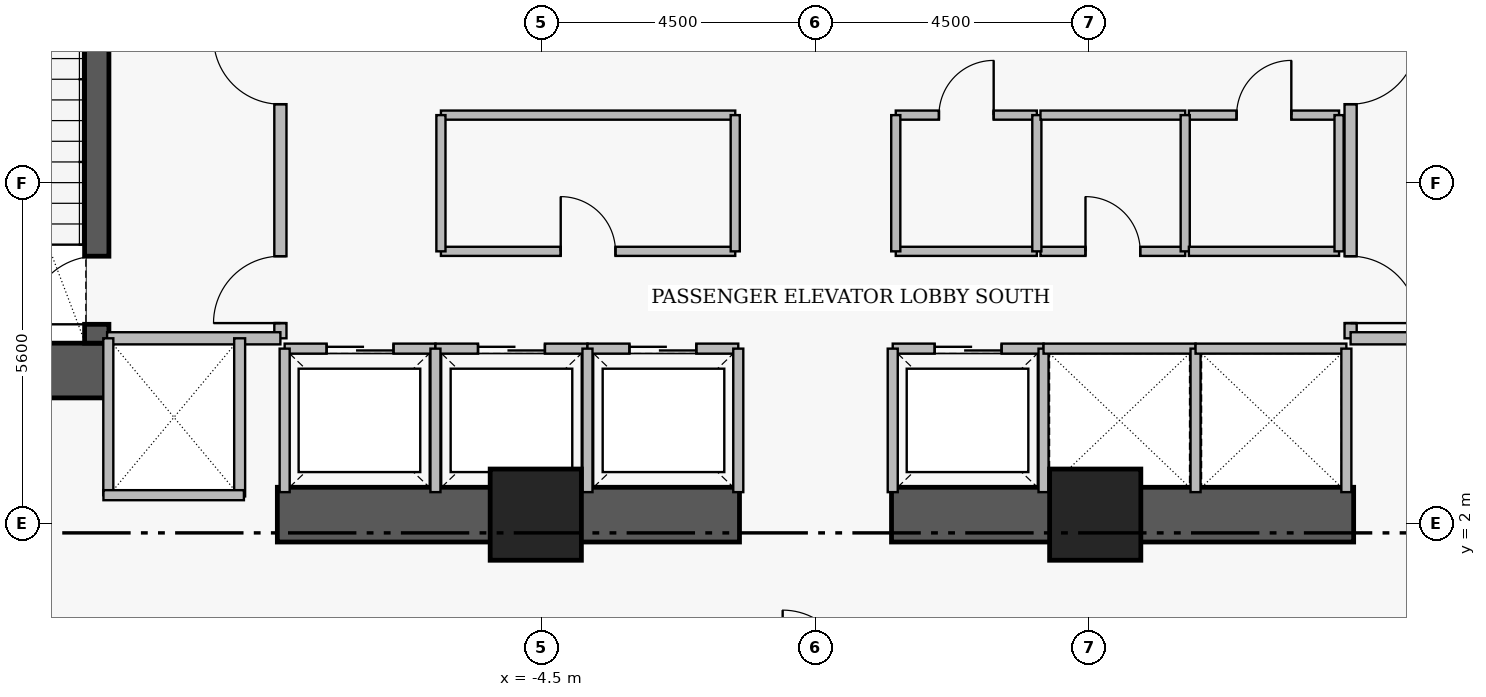
"""IFC4 building model, lengths in metres.
Left out: names, types, materials, properties, quantities, classifications, styles, units other than length and angle.
Written with IfcOpenShell. Run it as: python <this file> out.ifc"""

import sys

from ifc_helpers import new_model, si_unit, direction, frame, frame_2d, origin, origin_2d, place, context, subcontext, project, spatial, rectangle, extrude, element, fill, save


model = new_model("IFC4")
c1 = context("Model", 3, precision=1e-05, world=origin(), true_north=direction((0.0, 1.0)))
c2 = subcontext(c1, "Body", "Model", "MODEL_VIEW")
j1 = project(units=[si_unit("LENGTHUNIT", "METRE"), si_unit("PLANEANGLEUNIT", "RADIAN")], contexts=[c1])
p1 = place(None, origin())
s1 = spatial("IfcSite", under=j1, at=p1, CompositionType="ELEMENT")
p2 = place(p1, origin())
s2 = spatial("IfcBuilding", under=s1, at=p2, CompositionType="ELEMENT")
p3 = place(p2, frame((0.0, 0.0, 22.8)))
s3 = spatial("IfcBuildingStorey", under=s2, at=p3, CompositionType="ELEMENT", Elevation=22.8)
p4 = place(p3, frame((-16.31, 4.52, 0.0), z_axis=(0.0, 0.0, 1.0), x_axis=(1.0, 0.0, 0.0)))
e1 = element("IfcWall", 1, at=p4, inside=s3, PredefinedType="SHEAR", context=c2, shape_type="SweptSolid", body=[
    extrude(rectangle(XDim=4.71, YDim=0.9, at=frame_2d((2.355, 0.0))), origin(), (0.0, 0.0, 1.0), 4.61),
])
for number, where, z_axis, x_axis in (
    (2, (-8.85, 2.15, 0.0), (0.0, 0.0, 1.0), (1.0, 0.0, 0.0)),
    (3, (1.25, 2.15, 0.0), (0.0, 0.0, 1.0), (1.0, 0.0, 0.0)),
):
    element("IfcWall", number, at=place(p3, frame(where, z_axis=z_axis, x_axis=x_axis)), inside=s3, PredefinedType="SHEAR", context=c2, shape_type="SweptSolid", body=[
        extrude(rectangle(XDim=7.6, YDim=0.9, at=frame_2d((3.8, 0.0))), origin(), (0.0, 0.0, 1.0), 4.58),
    ])
p5 = place(p3, frame((-11.82, 4.97, 0.0), z_axis=(0.0, 0.0, 1.0), x_axis=(0.0, 1.0, 0.0)))
e4 = element("IfcWall", 4, at=p5, inside=s3, PredefinedType="SHEAR", context=c2, shape_type="SweptSolid", body=[
    extrude(rectangle(XDim=8.96, YDim=0.4, at=frame_2d((4.48, 0.0))), origin(), (0.0, 0.0, 1.0), 4.61),
])
p6 = place(p5, frame((0.31, 0.0, 0.0)))
e5 = element("IfcOpeningElement", 5, at=p6, cuts=e4, PredefinedType="OPENING", context=c2, shape_type="SweptSolid", body=[
    extrude(rectangle(XDim=1.12, YDim=2.22, at=frame_2d((0.56, 1.11))), frame((0.0, 0.21, 0.0), z_axis=(0.0, -1.0, 0.0), x_axis=(1.0, 0.0, 0.0)), (0.0, 0.0, 1.0), 0.42),
])
for number, where, z_axis, x_axis in (
    (6, (-4.6, 2.15, 0.0), (0.0, 0.0, 1.0), (1.0, 0.0, 0.0)),
    (7, (4.6, 2.15, 0.0), (0.0, 0.0, 1.0), (1.0, 0.0, 0.0)),
):
    element("IfcColumn", number, at=place(p3, frame(where, z_axis=z_axis, x_axis=x_axis)), inside=s3, PredefinedType="COLUMN", context=c2, shape_type="SweptSolid", body=[
        extrude(rectangle(XDim=1.5, YDim=1.5, at=origin_2d()), origin(), (0.0, 0.0, 1.0), 4.8),
    ])
p7 = place(p3, frame((-8.8, 5.05, 0.0), z_axis=(0.0, 0.0, 1.0), x_axis=(0.0, 1.0, 0.0)))
e8 = element("IfcWall", 8, at=p7, inside=s3, PredefinedType="PARTITIONING", context=c2, shape_type="SweptSolid", body=[
    extrude(rectangle(XDim=6.1, YDim=0.2, at=frame_2d((3.05, 0.0))), origin(), (0.0, 0.0, 1.0), 4.58),
])
p8 = place(p7, frame((0.25, 0.0, 0.0)))
e9 = element("IfcOpeningElement", 9, at=p8, cuts=e8, PredefinedType="OPENING", context=c2, shape_type="SweptSolid", body=[
    extrude(rectangle(XDim=1.1, YDim=2.2, at=frame_2d((0.55, 1.1))), frame((0.0, 0.11, 0.0), z_axis=(0.0, -1.0, 0.0), x_axis=(1.0, 0.0, 0.0)), (0.0, 0.0, 1.0), 0.22),
])
p9 = place(p7, frame((3.85, 0.0, 0.0)))
e10 = element("IfcOpeningElement", 10, at=p9, cuts=e8, PredefinedType="OPENING", context=c2, shape_type="SweptSolid", body=[
    extrude(rectangle(XDim=1.1, YDim=2.2, at=frame_2d((0.55, 1.1))), frame((0.0, 0.11, 0.0), z_axis=(0.0, -1.0, 0.0), x_axis=(1.0, 0.0, 0.0)), (0.0, 0.0, 1.0), 0.22),
])
p10 = place(p3, frame((8.8, 11.15, 0.0), z_axis=(0.0, 0.0, 1.0), x_axis=(0.0, -1.0, 0.0)))
e11 = element("IfcWall", 11, at=p10, inside=s3, PredefinedType="PARTITIONING", context=c2, shape_type="SweptSolid", body=[
    extrude(rectangle(XDim=6.1, YDim=0.2, at=frame_2d((3.05, 0.0))), origin(), (0.0, 0.0, 1.0), 4.58),
])
p11 = place(p10, frame((1.15, 0.0, 0.0)))
e12 = element("IfcOpeningElement", 12, at=p11, cuts=e11, PredefinedType="OPENING", context=c2, shape_type="SweptSolid", body=[
    extrude(rectangle(XDim=1.1, YDim=2.2, at=frame_2d((0.55, 1.1))), frame((0.0, 0.11, 0.0), z_axis=(0.0, -1.0, 0.0), x_axis=(1.0, 0.0, 0.0)), (0.0, 0.0, 1.0), 0.22),
])
p12 = place(p10, frame((4.75, 0.0, 0.0)))
e13 = element("IfcOpeningElement", 13, at=p12, cuts=e11, PredefinedType="OPENING", context=c2, shape_type="SweptSolid", body=[
    extrude(rectangle(XDim=1.1, YDim=2.2, at=frame_2d((0.55, 1.1))), frame((0.0, 0.11, 0.0), z_axis=(0.0, -1.0, 0.0), x_axis=(1.0, 0.0, 0.0)), (0.0, 0.0, 1.0), 0.22),
])
p13 = place(p3, frame((-8.73, 4.88, 0.0), z_axis=(0.0, 0.0, 1.0), x_axis=(1.0, 0.0, 0.0)))
e14 = element("IfcWall", 14, at=p13, inside=s3, PredefinedType="PARTITIONING", context=c2, shape_type="SweptSolid", body=[
    extrude(rectangle(XDim=2.48, YDim=0.165, at=frame_2d((1.24, 0.0))), origin(), (0.0, 0.0, 1.0), 4.58),
])
p14 = place(p13, frame((0.69, 0.0, 0.0)))
e15 = element("IfcOpeningElement", 15, at=p14, cuts=e14, PredefinedType="OPENING", context=c2, shape_type="SweptSolid", body=[
    extrude(rectangle(XDim=1.1, YDim=2.25, at=frame_2d((0.55, 1.125))), frame((0.0, 0.093, 0.0), z_axis=(0.0, -1.0, 0.0), x_axis=(1.0, 0.0, 0.0)), (0.0, 0.0, 1.0), 0.185),
])
p15 = place(p3, frame((-6.25, 4.88, 0.0), z_axis=(0.0, 0.0, 1.0), x_axis=(1.0, 0.0, 0.0)))
e16 = element("IfcWall", 16, at=p15, inside=s3, PredefinedType="PARTITIONING", context=c2, shape_type="SweptSolid", body=[
    extrude(rectangle(XDim=2.5, YDim=0.165, at=frame_2d((1.25, 0.0))), origin(), (0.0, 0.0, 1.0), 4.58),
])
p16 = place(p15, frame((0.7, 0.0, 0.0)))
e17 = element("IfcOpeningElement", 17, at=p16, cuts=e16, PredefinedType="OPENING", context=c2, shape_type="SweptSolid", body=[
    extrude(rectangle(XDim=1.1, YDim=2.25, at=frame_2d((0.55, 1.125))), frame((0.0, 0.093, 0.0), z_axis=(0.0, -1.0, 0.0), x_axis=(1.0, 0.0, 0.0)), (0.0, 0.0, 1.0), 0.185),
])
p17 = place(p3, frame((-3.75, 4.88, 0.0), z_axis=(0.0, 0.0, 1.0), x_axis=(1.0, 0.0, 0.0)))
e18 = element("IfcWall", 18, at=p17, inside=s3, PredefinedType="PARTITIONING", context=c2, shape_type="SweptSolid", body=[
    extrude(rectangle(XDim=2.48, YDim=0.165, at=frame_2d((1.24, 0.0))), origin(), (0.0, 0.0, 1.0), 4.58),
])
p18 = place(p17, frame((0.69, 0.0, 0.0)))
e19 = element("IfcOpeningElement", 19, at=p18, cuts=e18, PredefinedType="OPENING", context=c2, shape_type="SweptSolid", body=[
    extrude(rectangle(XDim=1.1, YDim=2.25, at=frame_2d((0.55, 1.125))), frame((0.0, 0.093, 0.0), z_axis=(0.0, -1.0, 0.0), x_axis=(1.0, 0.0, 0.0)), (0.0, 0.0, 1.0), 0.185),
])
p19 = place(p3, frame((1.27, 4.88, 0.0), z_axis=(0.0, 0.0, 1.0), x_axis=(1.0, 0.0, 0.0)))
e20 = element("IfcWall", 20, at=p19, inside=s3, PredefinedType="PARTITIONING", context=c2, shape_type="SweptSolid", body=[
    extrude(rectangle(XDim=2.48, YDim=0.165, at=frame_2d((1.24, 0.0))), origin(), (0.0, 0.0, 1.0), 4.58),
])
p20 = place(p19, frame((0.69, 0.0, 0.0)))
e21 = element("IfcOpeningElement", 21, at=p20, cuts=e20, PredefinedType="OPENING", context=c2, shape_type="SweptSolid", body=[
    extrude(rectangle(XDim=1.1, YDim=2.25, at=frame_2d((0.55, 1.125))), frame((0.0, 0.093, 0.0), z_axis=(0.0, -1.0, 0.0), x_axis=(1.0, 0.0, 0.0)), (0.0, 0.0, 1.0), 0.185),
])
p21 = place(p3, frame((-6.16, 6.48, 0.0), z_axis=(0.0, 0.0, 1.0), x_axis=(1.0, 0.0, 0.0)))
e22 = element("IfcWall", 22, at=p21, inside=s3, PredefinedType="PARTITIONING", context=c2, shape_type="SweptSolid", body=[
    extrude(rectangle(XDim=4.84, YDim=0.15, at=frame_2d((2.42, 0.0))), origin(), (0.0, 0.0, 1.0), 4.58),
])
p22 = place(p21, frame((1.97, 0.0, 0.0)))
e23 = element("IfcOpeningElement", 23, at=p22, cuts=e22, PredefinedType="OPENING", context=c2, shape_type="SweptSolid", body=[
    extrude(rectangle(XDim=0.9, YDim=2.15, at=frame_2d((0.45, 1.075))), frame((0.0, 0.085, 0.0), z_axis=(0.0, -1.0, 0.0), x_axis=(1.0, 0.0, 0.0)), (0.0, 0.0, 1.0), 0.17),
])
p23 = place(p3, frame((1.32, 8.72, 0.0), z_axis=(0.0, 0.0, 1.0), x_axis=(1.0, 0.0, 0.0)))
e24 = element("IfcWall", 24, at=p23, inside=s3, PredefinedType="PARTITIONING", context=c2, shape_type="SweptSolid", body=[
    extrude(rectangle(XDim=2.32, YDim=0.15, at=frame_2d((1.16, 0.0))), origin(), (0.0, 0.0, 1.0), 4.58),
])
p24 = place(p23, frame((0.71, 0.0, 0.0)))
e25 = element("IfcOpeningElement", 25, at=p24, cuts=e24, PredefinedType="OPENING", context=c2, shape_type="SweptSolid", body=[
    extrude(rectangle(XDim=0.9, YDim=2.15, at=frame_2d((0.45, 1.075))), frame((0.0, 0.085, 0.0), z_axis=(0.0, -1.0, 0.0), x_axis=(1.0, 0.0, 0.0)), (0.0, 0.0, 1.0), 0.17),
])
p25 = place(p3, frame((3.7, 6.48, 0.0), z_axis=(0.0, 0.0, 1.0), x_axis=(1.0, 0.0, 0.0)))
e26 = element("IfcWall", 26, at=p25, inside=s3, PredefinedType="PARTITIONING", context=c2, shape_type="SweptSolid", body=[
    extrude(rectangle(XDim=2.38, YDim=0.15, at=frame_2d((1.19, 0.0))), origin(), (0.0, 0.0, 1.0), 4.58),
])
p26 = place(p25, frame((0.74, 0.0, 0.0)))
e27 = element("IfcOpeningElement", 27, at=p26, cuts=e26, PredefinedType="OPENING", context=c2, shape_type="SweptSolid", body=[
    extrude(rectangle(XDim=0.9, YDim=2.15, at=frame_2d((0.45, 1.075))), frame((0.0, 0.085, 0.0), z_axis=(0.0, -1.0, 0.0), x_axis=(1.0, 0.0, 0.0)), (0.0, 0.0, 1.0), 0.17),
])
p27 = place(p3, frame((6.14, 8.72, 0.0), z_axis=(0.0, 0.0, 1.0), x_axis=(1.0, 0.0, 0.0)))
e28 = element("IfcWall", 28, at=p27, inside=s3, PredefinedType="PARTITIONING", context=c2, shape_type="SweptSolid", body=[
    extrude(rectangle(XDim=2.47, YDim=0.15, at=frame_2d((1.235, 0.0))), origin(), (0.0, 0.0, 1.0), 4.58),
])
p28 = place(p27, frame((0.785, 0.0, 0.0)))
e29 = element("IfcOpeningElement", 29, at=p28, cuts=e28, PredefinedType="OPENING", context=c2, shape_type="SweptSolid", body=[
    extrude(rectangle(XDim=0.9, YDim=2.15, at=frame_2d((0.45, 1.075))), frame((0.0, 0.085, 0.0), z_axis=(0.0, -1.0, 0.0), x_axis=(1.0, 0.0, 0.0)), (0.0, 0.0, 1.0), 0.17),
])
for number, where, z_axis, x_axis in (
    (30, (-11.65, 5.05, 0.0), (0.0, 0.0, 1.0), (1.0, 0.0, 0.0)),
    (31, (8.8, 5.05, 0.0), (0.0, 0.0, 1.0), (1.0, 0.0, 0.0)),
):
    element("IfcWall", number, at=place(p3, frame(where, z_axis=z_axis, x_axis=x_axis)), inside=s3, PredefinedType="PARTITIONING", context=c2, shape_type="SweptSolid", body=[
        extrude(rectangle(XDim=2.85, YDim=0.2, at=frame_2d((1.425, 0.0))), origin(), (0.0, 0.0, 1.0), 4.58),
    ])
for number, where, z_axis, x_axis in (
    (32, (-8.73, 2.52, 0.0), (0.0, 0.0, 1.0), (0.0, 1.0, 0.0)),
    (33, (-6.25, 2.52, 0.0), (0.0, 0.0, 1.0), (0.0, 1.0, 0.0)),
    (34, (-3.75, 2.52, 0.0), (0.0, 0.0, 1.0), (0.0, 1.0, 0.0)),
    (35, (-1.27, 2.52, 0.0), (0.0, 0.0, 1.0), (0.0, 1.0, 0.0)),
    (36, (1.27, 2.52, 0.0), (0.0, 0.0, 1.0), (0.0, 1.0, 0.0)),
    (37, (3.75, 2.52, 0.0), (0.0, 0.0, 1.0), (0.0, 1.0, 0.0)),
):
    element("IfcWall", number, at=place(p3, frame(where, z_axis=z_axis, x_axis=x_axis)), inside=s3, PredefinedType="PARTITIONING", context=c2, shape_type="SweptSolid", body=[
        extrude(rectangle(XDim=2.36, YDim=0.165, at=frame_2d((1.18, 0.0))), origin(), (0.0, 0.0, 1.0), 4.58),
    ])
p29 = place(p3, frame((3.75, 4.88, 0.0), z_axis=(0.0, 0.0, 1.0), x_axis=(1.0, 0.0, 0.0)))
e38 = element("IfcWall", 38, at=p29, inside=s3, PredefinedType="PARTITIONING", context=c2, shape_type="SweptSolid", body=[
    extrude(rectangle(XDim=2.5, YDim=0.165, at=frame_2d((1.25, 0.0))), origin(), (0.0, 0.0, 1.0), 4.58),
])
p30 = place(p3, frame((6.25, 2.52, 0.0), z_axis=(0.0, 0.0, 1.0), x_axis=(0.0, 1.0, 0.0)))
e39 = element("IfcWall", 39, at=p30, inside=s3, PredefinedType="PARTITIONING", context=c2, shape_type="SweptSolid", body=[
    extrude(rectangle(XDim=2.36, YDim=0.165, at=frame_2d((1.18, 0.0))), origin(), (0.0, 0.0, 1.0), 4.58),
])
p31 = place(p3, frame((6.25, 4.88, 0.0), z_axis=(0.0, 0.0, 1.0), x_axis=(1.0, 0.0, 0.0)))
e40 = element("IfcWall", 40, at=p31, inside=s3, PredefinedType="PARTITIONING", context=c2, shape_type="SweptSolid", body=[
    extrude(rectangle(XDim=2.48, YDim=0.165, at=frame_2d((1.24, 0.0))), origin(), (0.0, 0.0, 1.0), 4.58),
])
p32 = place(p3, frame((8.73, 2.52, 0.0), z_axis=(0.0, 0.0, 1.0), x_axis=(0.0, 1.0, 0.0)))
e41 = element("IfcWall", 41, at=p32, inside=s3, PredefinedType="PARTITIONING", context=c2, shape_type="SweptSolid", body=[
    extrude(rectangle(XDim=2.36, YDim=0.165, at=frame_2d((1.18, 0.0))), origin(), (0.0, 0.0, 1.0), 4.58),
])
p33 = place(p3, frame((-9.47, 2.45, 0.0), z_axis=(0.0, 0.0, 1.0), x_axis=(0.0, 1.0, 0.0)))
e42 = element("IfcWall", 42, at=p33, inside=s3, PredefinedType="PARTITIONING", context=c2, shape_type="SweptSolid", body=[
    extrude(rectangle(XDim=2.6, YDim=0.18, at=frame_2d((1.3, 0.0))), origin(), (0.0, 0.0, 1.0), 4.58),
])
p34 = place(p3, frame((-11.63, 2.47, 0.0), z_axis=(0.0, 0.0, 1.0), x_axis=(0.0, 1.0, 0.0)))
e43 = element("IfcWall", 43, at=p34, inside=s3, PredefinedType="PARTITIONING", context=c2, shape_type="SweptSolid", body=[
    extrude(rectangle(XDim=2.58, YDim=0.165, at=frame_2d((1.29, 0.0))), origin(), (0.0, 0.0, 1.0), 4.58),
])
p35 = place(p3, frame((-11.71, 2.47, 0.0), z_axis=(0.0, 0.0, 1.0), x_axis=(1.0, 0.0, 0.0)))
e44 = element("IfcWall", 44, at=p35, inside=s3, PredefinedType="PARTITIONING", context=c2, shape_type="SweptSolid", body=[
    extrude(rectangle(XDim=2.31, YDim=0.165, at=frame_2d((1.155, 0.0))), origin(), (0.0, 0.0, 1.0), 3.18),
])
p36 = place(p3, frame((-6.16, 8.72, 0.0), z_axis=(0.0, 0.0, 1.0), x_axis=(1.0, 0.0, 0.0)))
e45 = element("IfcWall", 45, at=p36, inside=s3, PredefinedType="PARTITIONING", context=c2, shape_type="SweptSolid", body=[
    extrude(rectangle(XDim=4.84, YDim=0.15, at=frame_2d((2.42, 0.0))), origin(), (0.0, 0.0, 1.0), 4.58),
])
for number, where, z_axis, x_axis in (
    (46, (-6.16, 6.48, 0.0), (0.0, 0.0, 1.0), (0.0, 1.0, 0.0)),
    (47, (-1.32, 6.48, 0.0), (0.0, 0.0, 1.0), (0.0, 1.0, 0.0)),
):
    element("IfcWall", number, at=place(p3, frame(where, z_axis=z_axis, x_axis=x_axis)), inside=s3, PredefinedType="PARTITIONING", context=c2, shape_type="SweptSolid", body=[
        extrude(rectangle(XDim=2.24, YDim=0.15, at=frame_2d((1.12, 0.0))), origin(), (0.0, 0.0, 1.0), 4.58),
    ])
p37 = place(p3, frame((1.32, 6.48, 0.0), z_axis=(0.0, 0.0, 1.0), x_axis=(1.0, 0.0, 0.0)))
e48 = element("IfcWall", 48, at=p37, inside=s3, PredefinedType="PARTITIONING", context=c2, shape_type="SweptSolid", body=[
    extrude(rectangle(XDim=2.32, YDim=0.15, at=frame_2d((1.16, 0.0))), origin(), (0.0, 0.0, 1.0), 4.58),
])
for number, where, z_axis, x_axis in (
    (49, (1.32, 6.48, 0.0), (0.0, 0.0, 1.0), (0.0, 1.0, 0.0)),
    (50, (3.64, 6.48, 0.0), (0.0, 0.0, 1.0), (0.0, 1.0, 0.0)),
):
    element("IfcWall", number, at=place(p3, frame(where, z_axis=z_axis, x_axis=x_axis)), inside=s3, PredefinedType="PARTITIONING", context=c2, shape_type="SweptSolid", body=[
        extrude(rectangle(XDim=2.24, YDim=0.15, at=frame_2d((1.12, 0.0))), origin(), (0.0, 0.0, 1.0), 4.58),
    ])
p38 = place(p3, frame((3.7, 8.72, 0.0), z_axis=(0.0, 0.0, 1.0), x_axis=(1.0, 0.0, 0.0)))
e51 = element("IfcWall", 51, at=p38, inside=s3, PredefinedType="PARTITIONING", context=c2, shape_type="SweptSolid", body=[
    extrude(rectangle(XDim=2.38, YDim=0.15, at=frame_2d((1.19, 0.0))), origin(), (0.0, 0.0, 1.0), 4.58),
])
p39 = place(p3, frame((6.08, 6.48, 0.0), z_axis=(0.0, 0.0, 1.0), x_axis=(0.0, 1.0, 0.0)))
e52 = element("IfcWall", 52, at=p39, inside=s3, PredefinedType="PARTITIONING", context=c2, shape_type="SweptSolid", body=[
    extrude(rectangle(XDim=2.24, YDim=0.15, at=frame_2d((1.12, 0.0))), origin(), (0.0, 0.0, 1.0), 4.58),
])
p40 = place(p3, frame((6.14, 6.48, 0.0), z_axis=(0.0, 0.0, 1.0), x_axis=(1.0, 0.0, 0.0)))
e53 = element("IfcWall", 53, at=p40, inside=s3, PredefinedType="PARTITIONING", context=c2, shape_type="SweptSolid", body=[
    extrude(rectangle(XDim=2.47, YDim=0.15, at=frame_2d((1.235, 0.0))), origin(), (0.0, 0.0, 1.0), 4.58),
])
p41 = place(p3, frame((8.61, 6.48, 0.0), z_axis=(0.0, 0.0, 1.0), x_axis=(0.0, 1.0, 0.0)))
e54 = element("IfcWall", 54, at=p41, inside=s3, PredefinedType="PARTITIONING", context=c2, shape_type="SweptSolid", body=[
    extrude(rectangle(XDim=2.24, YDim=0.15, at=frame_2d((1.12, 0.0))), origin(), (0.0, 0.0, 1.0), 4.58),
])
p42 = place(p6, origin())
e55 = element("IfcDoor", 55, at=p42, inside=s3, OperationType="SINGLE_SWING_LEFT", PredefinedType="DOOR", context=c2, shape_type="SweptSolid", body=[
    extrude(rectangle(XDim=1.12, YDim=2.22, at=frame_2d((0.56, 1.11))), frame((0.0, 0.025, 0.0), z_axis=(0.0, -1.0, 0.0), x_axis=(1.0, 0.0, 0.0)), (0.0, 0.0, 1.0), 0.05),
])
fill(e5, e55)
p43 = place(p8, origin())
e56 = element("IfcDoor", 56, at=p43, inside=s3, OperationType="SINGLE_SWING_LEFT", PredefinedType="DOOR", context=c2, shape_type="SweptSolid", body=[
    extrude(rectangle(XDim=1.1, YDim=2.2, at=frame_2d((0.55, 1.1))), frame((0.0, 0.025, 0.0), z_axis=(0.0, -1.0, 0.0), x_axis=(1.0, 0.0, 0.0)), (0.0, 0.0, 1.0), 0.05),
])
fill(e9, e56)
p44 = place(p9, origin())
e57 = element("IfcDoor", 57, at=p44, inside=s3, OperationType="SINGLE_SWING_RIGHT", PredefinedType="DOOR", context=c2, shape_type="SweptSolid", body=[
    extrude(rectangle(XDim=1.1, YDim=2.2, at=frame_2d((0.55, 1.1))), frame((0.0, 0.025, 0.0), z_axis=(0.0, -1.0, 0.0), x_axis=(1.0, 0.0, 0.0)), (0.0, 0.0, 1.0), 0.05),
])
fill(e10, e57)
p45 = place(p11, origin())
e58 = element("IfcDoor", 58, at=p45, inside=s3, OperationType="SINGLE_SWING_LEFT", PredefinedType="DOOR", context=c2, shape_type="SweptSolid", body=[
    extrude(rectangle(XDim=1.1, YDim=2.2, at=frame_2d((0.55, 1.1))), frame((0.0, 0.025, 0.0), z_axis=(0.0, -1.0, 0.0), x_axis=(1.0, 0.0, 0.0)), (0.0, 0.0, 1.0), 0.05),
])
fill(e12, e58)
p46 = place(p12, origin())
e59 = element("IfcDoor", 59, at=p46, inside=s3, OperationType="SINGLE_SWING_RIGHT", PredefinedType="DOOR", context=c2, shape_type="SweptSolid", body=[
    extrude(rectangle(XDim=1.1, YDim=2.2, at=frame_2d((0.55, 1.1))), frame((0.0, 0.025, 0.0), z_axis=(0.0, -1.0, 0.0), x_axis=(1.0, 0.0, 0.0)), (0.0, 0.0, 1.0), 0.05),
])
fill(e13, e59)
p47 = place(p14, origin())
e60 = element("IfcDoor", 60, at=p47, inside=s3, OperationType="SLIDING_TO_LEFT", PredefinedType="DOOR", context=c2, shape_type="SweptSolid", body=[
    extrude(rectangle(XDim=1.1, YDim=2.25, at=frame_2d((0.55, 1.125))), frame((0.0, 0.025, 0.0), z_axis=(0.0, -1.0, 0.0), x_axis=(1.0, 0.0, 0.0)), (0.0, 0.0, 1.0), 0.05),
])
fill(e15, e60)
p48 = place(p16, origin())
e61 = element("IfcDoor", 61, at=p48, inside=s3, OperationType="SLIDING_TO_LEFT", PredefinedType="DOOR", context=c2, shape_type="SweptSolid", body=[
    extrude(rectangle(XDim=1.1, YDim=2.25, at=frame_2d((0.55, 1.125))), frame((0.0, 0.025, 0.0), z_axis=(0.0, -1.0, 0.0), x_axis=(1.0, 0.0, 0.0)), (0.0, 0.0, 1.0), 0.05),
])
fill(e17, e61)
p49 = place(p18, origin())
e62 = element("IfcDoor", 62, at=p49, inside=s3, OperationType="SLIDING_TO_LEFT", PredefinedType="DOOR", context=c2, shape_type="SweptSolid", body=[
    extrude(rectangle(XDim=1.1, YDim=2.25, at=frame_2d((0.55, 1.125))), frame((0.0, 0.025, 0.0), z_axis=(0.0, -1.0, 0.0), x_axis=(1.0, 0.0, 0.0)), (0.0, 0.0, 1.0), 0.05),
])
fill(e19, e62)
p50 = place(p20, origin())
e63 = element("IfcDoor", 63, at=p50, inside=s3, OperationType="SLIDING_TO_LEFT", PredefinedType="DOOR", context=c2, shape_type="SweptSolid", body=[
    extrude(rectangle(XDim=1.1, YDim=2.25, at=frame_2d((0.55, 1.125))), frame((0.0, 0.025, 0.0), z_axis=(0.0, -1.0, 0.0), x_axis=(1.0, 0.0, 0.0)), (0.0, 0.0, 1.0), 0.05),
])
fill(e21, e63)
p51 = place(p22, origin())
e64 = element("IfcDoor", 64, at=p51, inside=s3, OperationType="SINGLE_SWING_LEFT", PredefinedType="DOOR", context=c2, shape_type="SweptSolid", body=[
    extrude(rectangle(XDim=0.9, YDim=2.15, at=frame_2d((0.45, 1.075))), frame((0.0, 0.025, 0.0), z_axis=(0.0, -1.0, 0.0), x_axis=(1.0, 0.0, 0.0)), (0.0, 0.0, 1.0), 0.05),
])
fill(e23, e64)
p52 = place(p24, origin())
e65 = element("IfcDoor", 65, at=p52, inside=s3, OperationType="SINGLE_SWING_RIGHT", PredefinedType="DOOR", context=c2, shape_type="SweptSolid", body=[
    extrude(rectangle(XDim=0.9, YDim=2.15, at=frame_2d((0.45, 1.075))), frame((0.0, 0.025, 0.0), z_axis=(0.0, -1.0, 0.0), x_axis=(1.0, 0.0, 0.0)), (0.0, 0.0, 1.0), 0.05),
])
fill(e25, e65)
p53 = place(p26, origin())
e66 = element("IfcDoor", 66, at=p53, inside=s3, OperationType="SINGLE_SWING_LEFT", PredefinedType="DOOR", context=c2, shape_type="SweptSolid", body=[
    extrude(rectangle(XDim=0.9, YDim=2.15, at=frame_2d((0.45, 1.075))), frame((0.0, 0.025, 0.0), z_axis=(0.0, -1.0, 0.0), x_axis=(1.0, 0.0, 0.0)), (0.0, 0.0, 1.0), 0.05),
])
fill(e27, e66)
p54 = place(p28, origin())
e67 = element("IfcDoor", 67, at=p54, inside=s3, OperationType="SINGLE_SWING_RIGHT", PredefinedType="DOOR", context=c2, shape_type="SweptSolid", body=[
    extrude(rectangle(XDim=0.9, YDim=2.15, at=frame_2d((0.45, 1.075))), frame((0.0, 0.025, 0.0), z_axis=(0.0, -1.0, 0.0), x_axis=(1.0, 0.0, 0.0)), (0.0, 0.0, 1.0), 0.05),
])
fill(e29, e67)
save(model, sys.argv[1])
